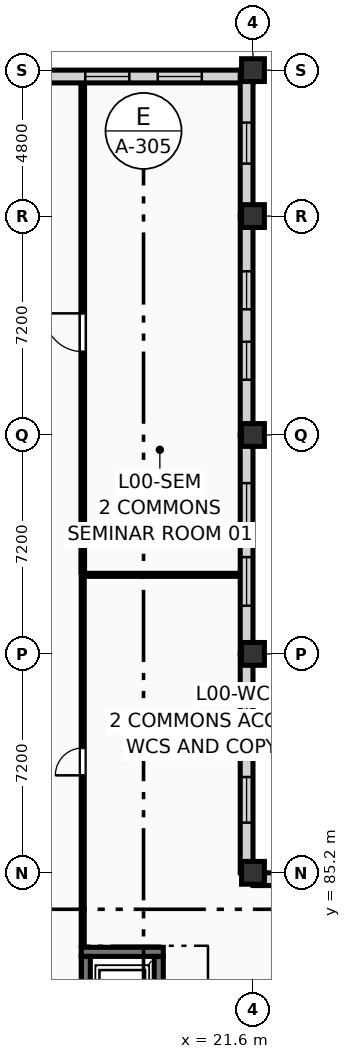
"""IFC4 building model, lengths in metres.
Left out: names, types, materials, properties, quantities, classifications, styles, units other than length and angle.
Written with IfcOpenShell. Run it as: python <this file> out.ifc"""

import sys

from ifc_helpers import new_model, si_unit, direction, frame, frame_2d, origin, origin_2d, place, context, subcontext, project, spatial, rectangle, extrude, element, fill, save


model = new_model("IFC4")
c1 = context("Model", 3, precision=1e-05, world=origin(), true_north=direction((0.0, 1.0)))
c2 = subcontext(c1, "Body", "Model", "MODEL_VIEW")
j1 = project(units=[si_unit("LENGTHUNIT", "METRE"), si_unit("PLANEANGLEUNIT", "RADIAN")], contexts=[c1])
p1 = place(None, origin())
s1 = spatial("IfcSite", under=j1, at=p1, CompositionType="ELEMENT")
p2 = place(p1, origin())
s2 = spatial("IfcBuilding", under=s1, at=p2, CompositionType="ELEMENT")
p3 = place(p2, origin())
s3 = spatial("IfcBuildingStorey", under=s2, at=p3, CompositionType="ELEMENT", Elevation=0.0)
for number, where, z_axis, x_axis in (
    (1, (21.6, 85.2, 0.0), (0.0, 0.0, 1.0), (1.0, 0.0, 0.0)),
    (2, (21.6, 92.4, 0.0), (0.0, 0.0, 1.0), (1.0, 0.0, 0.0)),
    (3, (21.6, 99.6, 0.0), (0.0, 0.0, 1.0), (1.0, 0.0, 0.0)),
    (4, (21.6, 106.8, 0.0), (0.0, 0.0, 1.0), (1.0, 0.0, 0.0)),
    (5, (21.6, 111.6, 0.0), (0.0, 0.0, 1.0), (1.0, 0.0, 0.0)),
):
    element("IfcColumn", number, at=place(p3, frame(where, z_axis=z_axis, x_axis=x_axis)), inside=s3, PredefinedType="COLUMN", context=c2, shape_type="SweptSolid", body=[
        extrude(rectangle(XDim=0.75, YDim=0.75, at=origin_2d()), origin(), (0.0, 0.0, 1.0), 4.5),
    ])
p4 = place(p3, frame((14.4, 111.39, 0.0), z_axis=(0.0, 0.0, 1.0), x_axis=(1.0, 0.0, 0.0)))
e6 = element("IfcWall", 6, at=p4, inside=s3, PredefinedType="SOLIDWALL", context=c2, shape_type="SweptSolid", body=[
    extrude(rectangle(XDim=7.2, YDim=0.42, at=frame_2d((3.6, 0.0))), origin(), (0.0, 0.0, 1.0), 3.62),
])
p5 = place(p4, frame((1.683, 0.0, 0.45)))
e7 = element("IfcOpeningElement", 7, at=p5, cuts=e6, PredefinedType="OPENING", context=c2, shape_type="SweptSolid", body=[
    extrude(rectangle(XDim=1.45, YDim=2.8, at=frame_2d((0.725, 1.4))), frame((0.0, 0.222, 0.0), z_axis=(0.0, -1.0, 0.0), x_axis=(1.0, 0.0, 0.0)), (0.0, 0.0, 1.0), 0.444),
])
p6 = place(p4, frame((4.067, 0.0, 0.45)))
e8 = element("IfcOpeningElement", 8, at=p6, cuts=e6, PredefinedType="OPENING", context=c2, shape_type="SweptSolid", body=[
    extrude(rectangle(XDim=1.45, YDim=2.8, at=frame_2d((0.725, 1.4))), frame((0.0, 0.222, 0.0), z_axis=(0.0, -1.0, 0.0), x_axis=(1.0, 0.0, 0.0)), (0.0, 0.0, 1.0), 0.444),
])
p7 = place(p3, frame((21.39, 106.8, 0.0), z_axis=(0.0, 0.0, 1.0), x_axis=(0.0, 1.0, 0.0)))
e9 = element("IfcWall", 9, at=p7, inside=s3, PredefinedType="SOLIDWALL", context=c2, shape_type="SweptSolid", body=[
    extrude(rectangle(XDim=4.8, YDim=0.42, at=frame_2d((2.4, 0.0))), origin(), (0.0, 0.0, 1.0), 3.62),
])
p8 = place(p7, frame((1.725, 0.0, 0.45)))
e10 = element("IfcOpeningElement", 10, at=p8, cuts=e9, PredefinedType="OPENING", context=c2, shape_type="SweptSolid", body=[
    extrude(rectangle(XDim=1.35, YDim=2.75, at=frame_2d((0.675, 1.375))), frame((0.0, 0.222, 0.0), z_axis=(0.0, -1.0, 0.0), x_axis=(1.0, 0.0, 0.0)), (0.0, 0.0, 1.0), 0.444),
])
p9 = place(p3, frame((21.39, 99.6, 0.0), z_axis=(0.0, 0.0, 1.0), x_axis=(0.0, 1.0, 0.0)))
e11 = element("IfcWall", 11, at=p9, inside=s3, PredefinedType="SOLIDWALL", context=c2, shape_type="SweptSolid", body=[
    extrude(rectangle(XDim=7.2, YDim=0.42, at=frame_2d((3.6, 0.0))), origin(), (0.0, 0.0, 1.0), 3.62),
])
p10 = place(p9, frame((1.817, 0.0, 0.45)))
e12 = element("IfcOpeningElement", 12, at=p10, cuts=e11, PredefinedType="OPENING", context=c2, shape_type="SweptSolid", body=[
    extrude(rectangle(XDim=1.25, YDim=2.7, at=frame_2d((0.625, 1.35))), frame((0.0, 0.222, 0.0), z_axis=(0.0, -1.0, 0.0), x_axis=(1.0, 0.0, 0.0)), (0.0, 0.0, 1.0), 0.444),
])
p11 = place(p9, frame((4.133, 0.0, 0.45)))
e13 = element("IfcOpeningElement", 13, at=p11, cuts=e11, PredefinedType="OPENING", context=c2, shape_type="SweptSolid", body=[
    extrude(rectangle(XDim=1.25, YDim=2.7, at=frame_2d((0.625, 1.35))), frame((0.0, 0.222, 0.0), z_axis=(0.0, -1.0, 0.0), x_axis=(1.0, 0.0, 0.0)), (0.0, 0.0, 1.0), 0.444),
])
p12 = place(p3, frame((21.39, 92.4, 0.0), z_axis=(0.0, 0.0, 1.0), x_axis=(0.0, 1.0, 0.0)))
e14 = element("IfcWall", 14, at=p12, inside=s3, PredefinedType="SOLIDWALL", context=c2, shape_type="SweptSolid", body=[
    extrude(rectangle(XDim=7.2, YDim=0.42, at=frame_2d((3.6, 0.0))), origin(), (0.0, 0.0, 1.0), 3.62),
])
p13 = place(p12, frame((1.583, 0.0, 0.45)))
e15 = element("IfcOpeningElement", 15, at=p13, cuts=e14, PredefinedType="OPENING", context=c2, shape_type="SweptSolid", body=[
    extrude(rectangle(XDim=1.6, YDim=2.65, at=frame_2d((0.8, 1.325))), frame((0.0, 0.222, 0.0), z_axis=(0.0, -1.0, 0.0), x_axis=(1.0, 0.0, 0.0)), (0.0, 0.0, 1.0), 0.444),
])
p14 = place(p12, frame((4.017, 0.0, 0.45)))
e16 = element("IfcOpeningElement", 16, at=p14, cuts=e14, PredefinedType="OPENING", context=c2, shape_type="SweptSolid", body=[
    extrude(rectangle(XDim=1.6, YDim=2.65, at=frame_2d((0.8, 1.325))), frame((0.0, 0.222, 0.0), z_axis=(0.0, -1.0, 0.0), x_axis=(1.0, 0.0, 0.0)), (0.0, 0.0, 1.0), 0.444),
])
p15 = place(p3, frame((21.39, 85.2, 0.0), z_axis=(0.0, 0.0, 1.0), x_axis=(0.0, 1.0, 0.0)))
e17 = element("IfcWall", 17, at=p15, inside=s3, PredefinedType="SOLIDWALL", context=c2, shape_type="SweptSolid", body=[
    extrude(rectangle(XDim=7.2, YDim=0.42, at=frame_2d((3.6, 0.0))), origin(), (0.0, 0.0, 1.0), 3.62),
])
p16 = place(p15, frame((1.65, 0.0, 0.45)))
e18 = element("IfcOpeningElement", 18, at=p16, cuts=e17, PredefinedType="OPENING", context=c2, shape_type="SweptSolid", body=[
    extrude(rectangle(XDim=1.5, YDim=2.6, at=frame_2d((0.75, 1.3))), frame((0.0, 0.222, 0.0), z_axis=(0.0, -1.0, 0.0), x_axis=(1.0, 0.0, 0.0)), (0.0, 0.0, 1.0), 0.444),
])
p17 = place(p15, frame((4.05, 0.0, 0.45)))
e19 = element("IfcOpeningElement", 19, at=p17, cuts=e17, PredefinedType="OPENING", context=c2, shape_type="SweptSolid", body=[
    extrude(rectangle(XDim=1.5, YDim=2.6, at=frame_2d((0.75, 1.3))), frame((0.0, 0.222, 0.0), z_axis=(0.0, -1.0, 0.0), x_axis=(1.0, 0.0, 0.0)), (0.0, 0.0, 1.0), 0.444),
])
p18 = place(p3, frame((21.6, 84.99, 0.0), z_axis=(0.0, 0.0, 1.0), x_axis=(1.0, 0.0, 0.0)))
e20 = element("IfcWall", 20, at=p18, inside=s3, PredefinedType="SOLIDWALL", context=c2, shape_type="SweptSolid", body=[
    extrude(rectangle(XDim=7.2, YDim=0.42, at=frame_2d((3.6, 0.0))), origin(), (0.0, 0.0, 1.0), 3.62),
])
p19 = place(p18, frame((1.717, 0.0, 0.45)))
e21 = element("IfcOpeningElement", 21, at=p19, cuts=e20, PredefinedType="OPENING", context=c2, shape_type="SweptSolid", body=[
    extrude(rectangle(XDim=1.4, YDim=2.55, at=frame_2d((0.7, 1.275))), frame((0.0, 0.222, 0.0), z_axis=(0.0, -1.0, 0.0), x_axis=(1.0, 0.0, 0.0)), (0.0, 0.0, 1.0), 0.444),
])
p20 = place(p18, frame((4.083, 0.0, 0.45)))
e22 = element("IfcOpeningElement", 22, at=p20, cuts=e20, PredefinedType="OPENING", context=c2, shape_type="SweptSolid", body=[
    extrude(rectangle(XDim=1.4, YDim=2.55, at=frame_2d((0.7, 1.275))), frame((0.0, 0.222, 0.0), z_axis=(0.0, -1.0, 0.0), x_axis=(1.0, 0.0, 0.0)), (0.0, 0.0, 1.0), 0.444),
])
p21 = place(p3, frame((15.95, 82.6, 0.0), z_axis=(0.0, 0.0, 1.0), x_axis=(1.0, 0.0, 0.0)))
e23 = element("IfcWall", 23, at=p21, inside=s3, PredefinedType="SHEAR", context=c2, shape_type="SweptSolid", body=[
    extrude(rectangle(XDim=2.7, YDim=0.3, at=frame_2d((1.35, 0.0))), origin(), (0.0, 0.0, 1.0), 4.25),
])
p22 = place(p3, frame((16.1, 79.78, 0.0), z_axis=(0.0, 0.0, 1.0), x_axis=(0.0, 1.0, 0.0)))
e24 = element("IfcWall", 24, at=p22, inside=s3, PredefinedType="SHEAR", context=c2, shape_type="SweptSolid", body=[
    extrude(rectangle(XDim=2.67, YDim=0.3, at=frame_2d((1.335, 0.0))), origin(), (0.0, 0.0, 1.0), 4.25),
])
p23 = place(p22, frame((0.785, 0.0, 0.0)))
e25 = element("IfcOpeningElement", 25, at=p23, cuts=e24, PredefinedType="OPENING", context=c2, shape_type="SweptSolid", body=[
    extrude(rectangle(XDim=1.1, YDim=2.2, at=frame_2d((0.55, 1.1))), frame((0.0, 0.162, 0.0), z_axis=(0.0, -1.0, 0.0), x_axis=(1.0, 0.0, 0.0)), (0.0, 0.0, 1.0), 0.324),
])
p24 = place(p3, frame((18.5, 79.78, 0.0), z_axis=(0.0, 0.0, 1.0), x_axis=(0.0, 1.0, 0.0)))
e26 = element("IfcWall", 26, at=p24, inside=s3, PredefinedType="SHEAR", context=c2, shape_type="SweptSolid", body=[
    extrude(rectangle(XDim=2.67, YDim=0.3, at=frame_2d((1.335, 0.0))), origin(), (0.0, 0.0, 1.0), 4.25),
])
p25 = place(p3, frame((16.0, 82.79, 0.0), z_axis=(0.0, 0.0, 1.0), x_axis=(0.0, 1.0, 0.0)))
e27 = element("IfcWall", 27, at=p25, inside=s3, PredefinedType="PARTITIONING", context=c2, shape_type="SweptSolid", body=[
    extrude(rectangle(XDim=12.13, YDim=0.1, at=frame_2d((6.065, 0.0))), origin(), (0.0, 0.0, 1.0), 4.235),
])
p26 = place(p25, frame((5.615, 0.0, 0.0)))
e28 = element("IfcOpeningElement", 28, at=p26, cuts=e27, PredefinedType="OPENING", context=c2, shape_type="SweptSolid", body=[
    extrude(rectangle(XDim=0.9, YDim=2.1, at=frame_2d((0.45, 1.05))), frame((0.0, 0.062, 0.0), z_axis=(0.0, -1.0, 0.0), x_axis=(1.0, 0.0, 0.0)), (0.0, 0.0, 1.0), 0.124),
])
p27 = place(p3, frame((16.08, 95.0, 0.0), z_axis=(0.0, 0.0, 1.0), x_axis=(1.0, 0.0, 0.0)))
e29 = element("IfcWall", 29, at=p27, inside=s3, PredefinedType="PARTITIONING", context=c2, shape_type="SweptSolid", body=[
    extrude(rectangle(XDim=5.04, YDim=0.1, at=frame_2d((2.52, 0.0))), origin(), (0.0, 0.0, 1.0), 4.235),
])
p28 = place(p3, frame((16.0, 95.08, 0.0), z_axis=(0.0, 0.0, 1.0), x_axis=(0.0, 1.0, 0.0)))
e30 = element("IfcWall", 30, at=p28, inside=s3, PredefinedType="PARTITIONING", context=c2, shape_type="SweptSolid", body=[
    extrude(rectangle(XDim=16.04, YDim=0.12, at=frame_2d((8.02, 0.0))), origin(), (0.0, 0.0, 1.0), 4.235),
])
p29 = place(p28, frame((7.26, 0.0, 0.0)))
e31 = element("IfcOpeningElement", 31, at=p29, cuts=e30, PredefinedType="OPENING", context=c2, shape_type="SweptSolid", body=[
    extrude(rectangle(XDim=1.26, YDim=2.18, at=frame_2d((0.63, 1.09))), frame((0.0, 0.072, 0.0), z_axis=(0.0, -1.0, 0.0), x_axis=(1.0, 0.0, 0.0)), (0.0, 0.0, 1.0), 0.144),
])
p30 = place(p5, origin())
e32 = element("IfcWindow", 32, at=p30, inside=s3, PartitioningType="SINGLE_PANEL", PredefinedType="WINDOW", context=c2, shape_type="SweptSolid", body=[
    extrude(rectangle(XDim=1.45, YDim=2.8, at=frame_2d((0.725, 1.4))), frame((0.0, 0.03, 0.0), z_axis=(0.0, -1.0, 0.0), x_axis=(1.0, 0.0, 0.0)), (0.0, 0.0, 1.0), 0.06),
])
fill(e7, e32)
p31 = place(p6, origin())
e33 = element("IfcWindow", 33, at=p31, inside=s3, PartitioningType="SINGLE_PANEL", PredefinedType="WINDOW", context=c2, shape_type="SweptSolid", body=[
    extrude(rectangle(XDim=1.45, YDim=2.8, at=frame_2d((0.725, 1.4))), frame((0.0, 0.03, 0.0), z_axis=(0.0, -1.0, 0.0), x_axis=(1.0, 0.0, 0.0)), (0.0, 0.0, 1.0), 0.06),
])
fill(e8, e33)
p32 = place(p8, origin())
e34 = element("IfcWindow", 34, at=p32, inside=s3, PartitioningType="SINGLE_PANEL", PredefinedType="WINDOW", context=c2, shape_type="SweptSolid", body=[
    extrude(rectangle(XDim=1.35, YDim=2.75, at=frame_2d((0.675, 1.375))), frame((0.0, 0.03, 0.0), z_axis=(0.0, -1.0, 0.0), x_axis=(1.0, 0.0, 0.0)), (0.0, 0.0, 1.0), 0.06),
])
fill(e10, e34)
p33 = place(p10, origin())
e35 = element("IfcWindow", 35, at=p33, inside=s3, PartitioningType="SINGLE_PANEL", PredefinedType="WINDOW", context=c2, shape_type="SweptSolid", body=[
    extrude(rectangle(XDim=1.25, YDim=2.7, at=frame_2d((0.625, 1.35))), frame((0.0, 0.03, 0.0), z_axis=(0.0, -1.0, 0.0), x_axis=(1.0, 0.0, 0.0)), (0.0, 0.0, 1.0), 0.06),
])
fill(e12, e35)
p34 = place(p11, origin())
e36 = element("IfcWindow", 36, at=p34, inside=s3, PartitioningType="SINGLE_PANEL", PredefinedType="WINDOW", context=c2, shape_type="SweptSolid", body=[
    extrude(rectangle(XDim=1.25, YDim=2.7, at=frame_2d((0.625, 1.35))), frame((0.0, 0.03, 0.0), z_axis=(0.0, -1.0, 0.0), x_axis=(1.0, 0.0, 0.0)), (0.0, 0.0, 1.0), 0.06),
])
fill(e13, e36)
p35 = place(p13, origin())
e37 = element("IfcWindow", 37, at=p35, inside=s3, PartitioningType="SINGLE_PANEL", PredefinedType="WINDOW", context=c2, shape_type="SweptSolid", body=[
    extrude(rectangle(XDim=1.6, YDim=2.65, at=frame_2d((0.8, 1.325))), frame((0.0, 0.03, 0.0), z_axis=(0.0, -1.0, 0.0), x_axis=(1.0, 0.0, 0.0)), (0.0, 0.0, 1.0), 0.06),
])
fill(e15, e37)
p36 = place(p14, origin())
e38 = element("IfcWindow", 38, at=p36, inside=s3, PartitioningType="SINGLE_PANEL", PredefinedType="WINDOW", context=c2, shape_type="SweptSolid", body=[
    extrude(rectangle(XDim=1.6, YDim=2.65, at=frame_2d((0.8, 1.325))), frame((0.0, 0.03, 0.0), z_axis=(0.0, -1.0, 0.0), x_axis=(1.0, 0.0, 0.0)), (0.0, 0.0, 1.0), 0.06),
])
fill(e16, e38)
p37 = place(p16, origin())
e39 = element("IfcWindow", 39, at=p37, inside=s3, PartitioningType="SINGLE_PANEL", PredefinedType="WINDOW", context=c2, shape_type="SweptSolid", body=[
    extrude(rectangle(XDim=1.5, YDim=2.6, at=frame_2d((0.75, 1.3))), frame((0.0, 0.03, 0.0), z_axis=(0.0, -1.0, 0.0), x_axis=(1.0, 0.0, 0.0)), (0.0, 0.0, 1.0), 0.06),
])
fill(e18, e39)
p38 = place(p17, origin())
e40 = element("IfcWindow", 40, at=p38, inside=s3, PartitioningType="SINGLE_PANEL", PredefinedType="WINDOW", context=c2, shape_type="SweptSolid", body=[
    extrude(rectangle(XDim=1.5, YDim=2.6, at=frame_2d((0.75, 1.3))), frame((0.0, 0.03, 0.0), z_axis=(0.0, -1.0, 0.0), x_axis=(1.0, 0.0, 0.0)), (0.0, 0.0, 1.0), 0.06),
])
fill(e19, e40)
p39 = place(p26, origin())
e41 = element("IfcDoor", 41, at=p39, inside=s3, OperationType="SINGLE_SWING_LEFT", PredefinedType="DOOR", context=c2, shape_type="SweptSolid", body=[
    extrude(rectangle(XDim=0.9, YDim=2.1, at=frame_2d((0.45, 1.05))), frame((0.0, 0.025, 0.0), z_axis=(0.0, -1.0, 0.0), x_axis=(1.0, 0.0, 0.0)), (0.0, 0.0, 1.0), 0.05),
])
fill(e28, e41)
p40 = place(p29, origin())
e42 = element("IfcDoor", 42, at=p40, inside=s3, OperationType="SINGLE_SWING_RIGHT", PredefinedType="DOOR", context=c2, shape_type="SweptSolid", body=[
    extrude(rectangle(XDim=1.26, YDim=2.18, at=frame_2d((0.63, 1.09))), frame((0.0, 0.025, 0.0), z_axis=(0.0, -1.0, 0.0), x_axis=(1.0, 0.0, 0.0)), (0.0, 0.0, 1.0), 0.05),
])
fill(e31, e42)
save(model, sys.argv[1])
